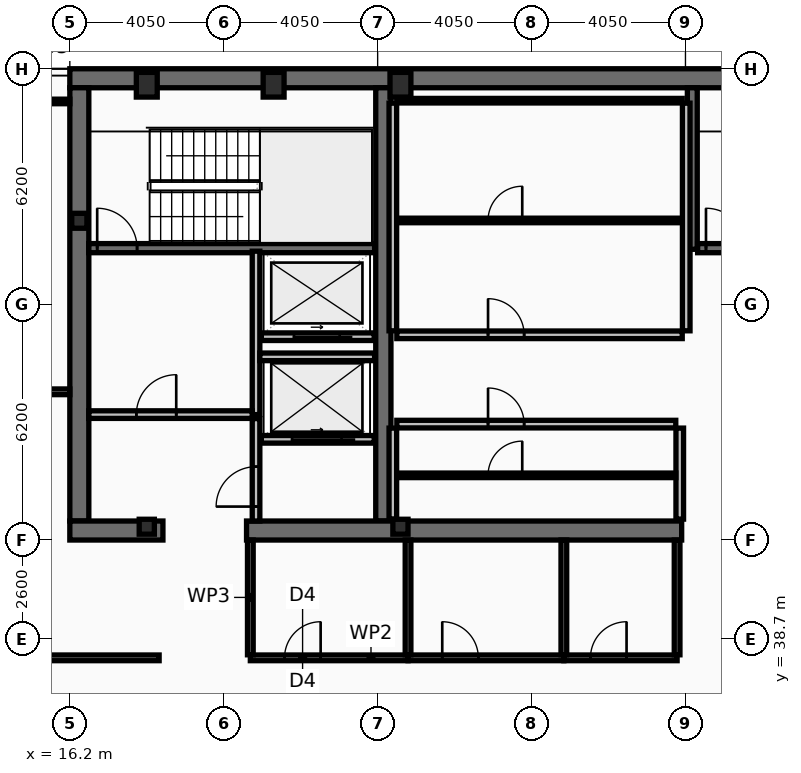
"""IFC4 building model, lengths in metres.
Left out: names, types, materials, properties, quantities, classifications, styles, units other than length and angle.
Written with IfcOpenShell. Run it as: python <this file> out.ifc"""

import sys

from ifc_helpers import new_model, si_unit, direction, frame, frame_2d, origin, origin_2d, place, context, subcontext, project, spatial, rectangle, hollow_rectangle, i_section, extrude, element, fill, save


model = new_model("IFC4")
c1 = context("Model", 3, precision=1e-05, world=origin(), true_north=direction((0.0, 1.0)))
c2 = subcontext(c1, "Body", "Model", "MODEL_VIEW")
j1 = project(units=[si_unit("LENGTHUNIT", "METRE"), si_unit("PLANEANGLEUNIT", "RADIAN")], contexts=[c1])
p1 = place(None, origin())
s1 = spatial("IfcSite", under=j1, at=p1, CompositionType="ELEMENT")
p2 = place(p1, origin())
s2 = spatial("IfcBuilding", under=s1, at=p2, CompositionType="ELEMENT")
p3 = place(p2, frame((0.0, 0.0, 302.2)))
s3 = spatial("IfcBuildingStorey", under=s2, at=p3, CompositionType="ELEMENT", Elevation=302.2)
p4 = place(p3, frame((16.2, 53.45, 0.0), z_axis=(0.0, 0.0, 1.0), x_axis=(1.0, 0.0, 0.0)))
e1 = element("IfcWall", 1, at=p4, inside=s3, PredefinedType="SHEAR", context=c2, shape_type="SweptSolid", body=[
    extrude(rectangle(XDim=40.5, YDim=0.5, at=frame_2d((20.25, 0.0))), origin(), (0.0, 0.0, 1.0), 3.38),
])
p5 = place(p3, frame((16.45, 41.8, 0.0), z_axis=(0.0, 0.0, 1.0), x_axis=(0.0, 1.0, 0.0)))
e2 = element("IfcWall", 2, at=p5, inside=s3, PredefinedType="SHEAR", context=c2, shape_type="SweptSolid", body=[
    extrude(rectangle(XDim=11.4, YDim=0.5, at=frame_2d((5.7, 0.0))), origin(), (0.0, 0.0, 1.0), 3.38),
])
p6 = place(p3, frame((24.45, 41.8, 0.0), z_axis=(0.0, 0.0, 1.0), x_axis=(0.0, 1.0, 0.0)))
e3 = element("IfcWall", 3, at=p6, inside=s3, PredefinedType="SHEAR", context=c2, shape_type="SweptSolid", body=[
    extrude(rectangle(XDim=11.4, YDim=0.4, at=frame_2d((5.7, 0.0))), origin(), (0.0, 0.0, 1.0), 3.38),
])
p7 = place(p3, frame((18.65, 41.55, 0.0), z_axis=(0.0, 0.0, 1.0), x_axis=(-1.0, 0.0, 0.0)))
e4 = element("IfcWall", 4, at=p7, inside=s3, PredefinedType="SHEAR", context=c2, shape_type="SweptSolid", body=[
    extrude(rectangle(XDim=2.45, YDim=0.5, at=frame_2d((1.225, 0.0))), origin(), (0.0, 0.0, 1.0), 3.38),
])
p8 = place(p3, frame((32.3, 41.55, 0.0), z_axis=(0.0, 0.0, 1.0), x_axis=(-1.0, 0.0, 0.0)))
e5 = element("IfcWall", 5, at=p8, inside=s3, PredefinedType="SHEAR", context=c2, shape_type="SweptSolid", body=[
    extrude(rectangle(XDim=11.45, YDim=0.5, at=frame_2d((5.725, 0.0))), origin(), (0.0, 0.0, 1.0), 3.38),
])
p9 = place(p3, frame((32.58, 48.95, 0.0), z_axis=(0.0, 0.0, 1.0), x_axis=(0.0, 1.0, 0.0)))
e6 = element("IfcWall", 6, at=p9, inside=s3, PredefinedType="SHEAR", context=c2, shape_type="SweptSolid", body=[
    extrude(rectangle(XDim=4.25, YDim=0.26, at=frame_2d((2.125, 0.0))), origin(), (0.0, 0.0, 1.0), 3.38),
])
p10 = place(p3, frame((16.7, 48.98, 0.0), z_axis=(0.0, 0.0, 1.0), x_axis=(1.0, 0.0, 0.0)))
e7 = element("IfcWall", 7, at=p10, inside=s3, PredefinedType="SHEAR", context=c2, shape_type="SweptSolid", body=[
    extrude(rectangle(XDim=7.52, YDim=0.24, at=frame_2d((3.76, 0.0))), origin(), (0.0, 0.0, 1.0), 3.38),
])
p11 = place(p10, frame((0.22, 0.0, 0.0)))
e8 = element("IfcOpeningElement", 8, at=p11, cuts=e7, PredefinedType="OPENING", context=c2, shape_type="SweptSolid", body=[
    extrude(rectangle(XDim=1.05, YDim=2.15, at=frame_2d((0.525, 1.075))), frame((0.0, 0.13, 0.0), z_axis=(0.0, -1.0, 0.0), x_axis=(1.0, 0.0, 0.0)), (0.0, 0.0, 1.0), 0.26),
])
p12 = place(p3, frame((32.72, 48.98, 0.0), z_axis=(0.0, 0.0, 1.0), x_axis=(1.0, 0.0, 0.0)))
e9 = element("IfcWall", 9, at=p12, inside=s3, PredefinedType="SHEAR", context=c2, shape_type="SweptSolid", body=[
    extrude(rectangle(XDim=7.56, YDim=0.24, at=frame_2d((3.78, 0.0))), origin(), (0.0, 0.0, 1.0), 3.38),
])
p13 = place(p12, frame((0.22, 0.0, 0.0)))
e10 = element("IfcOpeningElement", 10, at=p13, cuts=e9, PredefinedType="OPENING", context=c2, shape_type="SweptSolid", body=[
    extrude(rectangle(XDim=1.05, YDim=2.15, at=frame_2d((0.525, 1.075))), frame((0.0, 0.13, 0.0), z_axis=(0.0, -1.0, 0.0), x_axis=(1.0, 0.0, 0.0)), (0.0, 0.0, 1.0), 0.26),
])
for number, where, z_axis, x_axis in (
    (11, (18.225, 53.28, 0.0), (0.0, 0.0, 1.0), (1.0, 0.0, 0.0)),
    (12, (21.562, 53.28, 0.0), (0.0, 0.0, 1.0), (1.0, 0.0, 0.0)),
    (13, (24.9, 53.28, 0.0), (0.0, 0.0, 1.0), (1.0, 0.0, 0.0)),
):
    element("IfcColumn", number, at=place(p3, frame(where, z_axis=z_axis, x_axis=x_axis)), inside=s3, PredefinedType="COLUMN", context=c2, shape_type="SweptSolid", body=[
        extrude(hollow_rectangle(XDim=0.55, YDim=0.65, WallThickness=0.04, at=origin_2d()), origin(), (0.0, 0.0, 1.0), 3.6),
    ])
for number, where, z_axis, x_axis in (
    (14, (16.45, 49.7, 0.0), (0.0, 0.0, 1.0), (1.0, 0.0, 0.0)),
    (15, (18.225, 41.65, 0.0), (0.0, 0.0, 1.0), (1.0, 0.0, 0.0)),
    (16, (24.9, 41.65, 0.0), (0.0, 0.0, 1.0), (1.0, 0.0, 0.0)),
):
    element("IfcColumn", number, at=place(p3, frame(where, z_axis=z_axis, x_axis=x_axis)), inside=s3, PredefinedType="COLUMN", context=c2, shape_type="SweptSolid", body=[
        extrude(i_section(OverallWidth=0.399, OverallDepth=0.393, WebThickness=0.023, FlangeThickness=0.037, at=origin_2d()), origin(), (0.0, 0.0, 1.0), 3.6),
    ])
p14 = place(p3, frame((24.21, 43.95, 0.0), z_axis=(0.0, 0.0, 1.0), x_axis=(-1.0, 0.0, 0.0)))
e17 = element("IfcWall", 17, at=p14, inside=s3, PredefinedType="PARTITIONING", context=c2, shape_type="SweptSolid", body=[
    extrude(rectangle(XDim=2.97, YDim=0.2, at=frame_2d((1.485, 0.0))), origin(), (0.0, 0.0, 1.0), 3.38),
])
p15 = place(p14, frame((0.86, 0.0, 0.0)))
e18 = element("IfcOpeningElement", 18, at=p15, cuts=e17, PredefinedType="OPENING", context=c2, shape_type="SweptSolid", body=[
    extrude(rectangle(XDim=1.3, YDim=2.18, at=frame_2d((0.65, 1.09))), frame((0.0, 0.11, 0.0), z_axis=(0.0, -1.0, 0.0), x_axis=(1.0, 0.0, 0.0)), (0.0, 0.0, 1.0), 0.22),
])
p16 = place(p3, frame((24.21, 46.65, 0.0), z_axis=(0.0, 0.0, 1.0), x_axis=(-1.0, 0.0, 0.0)))
e19 = element("IfcWall", 19, at=p16, inside=s3, PredefinedType="PARTITIONING", context=c2, shape_type="SweptSolid", body=[
    extrude(rectangle(XDim=2.97, YDim=0.2, at=frame_2d((1.485, 0.0))), origin(), (0.0, 0.0, 1.0), 3.38),
])
p17 = place(p16, frame((0.91, 0.0, 0.0)))
e20 = element("IfcOpeningElement", 20, at=p17, cuts=e19, PredefinedType="OPENING", context=c2, shape_type="SweptSolid", body=[
    extrude(rectangle(XDim=1.2, YDim=2.18, at=frame_2d((0.6, 1.09))), frame((0.0, 0.11, 0.0), z_axis=(0.0, -1.0, 0.0), x_axis=(1.0, 0.0, 0.0)), (0.0, 0.0, 1.0), 0.22),
])
p18 = place(p3, frame((21.1, 44.6, 0.0), z_axis=(0.0, 0.0, 1.0), x_axis=(0.0, 1.0, 0.0)))
e21 = element("IfcWall", 21, at=p18, inside=s3, PredefinedType="PARTITIONING", context=c2, shape_type="SweptSolid", body=[
    extrude(rectangle(XDim=4.3, YDim=0.2, at=frame_2d((2.15, 0.0))), origin(), (0.0, 0.0, 1.0), 3.38),
])
p19 = place(p3, frame((16.7, 44.6, 0.0), z_axis=(0.0, 0.0, 1.0), x_axis=(1.0, 0.0, 0.0)))
e22 = element("IfcWall", 22, at=p19, inside=s3, PredefinedType="PARTITIONING", context=c2, shape_type="SweptSolid", body=[
    extrude(rectangle(XDim=4.3, YDim=0.2, at=frame_2d((2.15, 0.0))), origin(), (0.0, 0.0, 1.0), 3.38),
])
p20 = place(p19, frame((1.25, 0.0, 0.0)))
e23 = element("IfcOpeningElement", 23, at=p20, cuts=e22, PredefinedType="OPENING", context=c2, shape_type="SweptSolid", body=[
    extrude(rectangle(XDim=1.05, YDim=2.15, at=frame_2d((0.525, 1.075))), frame((0.0, 0.11, 0.0), z_axis=(0.0, -1.0, 0.0), x_axis=(1.0, 0.0, 0.0)), (0.0, 0.0, 1.0), 0.22),
])
p21 = place(p3, frame((21.2, 46.12, 0.0), z_axis=(0.0, 0.0, 1.0), x_axis=(1.0, 0.0, 0.0)))
e24 = element("IfcWall", 24, at=p21, inside=s3, PredefinedType="PARTITIONING", context=c2, shape_type="SweptSolid", body=[
    extrude(rectangle(XDim=3.02, YDim=0.2, at=frame_2d((1.51, 0.0))), origin(), (0.0, 0.0, 1.0), 3.38),
])
p22 = place(p3, frame((21.1, 41.8, 0.0), z_axis=(0.0, 0.0, 1.0), x_axis=(0.0, 1.0, 0.0)))
e25 = element("IfcWall", 25, at=p22, inside=s3, PredefinedType="PARTITIONING", context=c2, shape_type="SweptSolid", body=[
    extrude(rectangle(XDim=2.695, YDim=0.2, at=frame_2d((1.348, 0.0))), origin(), (0.0, 0.0, 1.0), 3.38),
])
p23 = place(p22, frame((0.38, 0.0, 0.0)))
e26 = element("IfcOpeningElement", 26, at=p23, cuts=e25, PredefinedType="OPENING", context=c2, shape_type="SweptSolid", body=[
    extrude(rectangle(XDim=1.05, YDim=2.15, at=frame_2d((0.525, 1.075))), frame((0.0, 0.11, 0.0), z_axis=(0.0, -1.0, 0.0), x_axis=(1.0, 0.0, 0.0)), (0.0, 0.0, 1.0), 0.22),
])
for number, where, z_axis, x_axis in (
    (27, (24.7, 46.805, 0.0), (0.0, 0.0, 1.0), (0.0, 1.0, 0.0)),
    (28, (32.42, 46.805, 0.0), (0.0, 0.0, 1.0), (0.0, 1.0, 0.0)),
):
    element("IfcWall", number, at=place(p3, frame(where, z_axis=z_axis, x_axis=x_axis)), inside=s3, PredefinedType="PARTITIONING", context=c2, shape_type="SweptSolid", body=[
        extrude(rectangle(XDim=5.99, YDim=0.2, at=frame_2d((2.995, 0.0))), origin(), (0.0, 0.0, 1.0), 3.38),
    ])
p24 = place(p3, frame((24.805, 52.86, 0.0), z_axis=(0.0, 0.0, 1.0), x_axis=(1.0, 0.0, 0.0)))
e29 = element("IfcWall", 29, at=p24, inside=s3, PredefinedType="PARTITIONING", context=c2, shape_type="SweptSolid", body=[
    extrude(rectangle(XDim=7.51, YDim=0.12, at=frame_2d((3.755, 0.0))), origin(), (0.0, 0.0, 1.0), 3.38),
])
p25 = place(p3, frame((24.805, 49.709, 0.0), z_axis=(0.0, 0.0, 1.0), x_axis=(1.0, 0.0, 0.0)))
e30 = element("IfcWall", 30, at=p25, inside=s3, PredefinedType="PARTITIONING", context=c2, shape_type="SweptSolid", body=[
    extrude(rectangle(XDim=7.51, YDim=0.12, at=frame_2d((3.755, 0.0))), origin(), (0.0, 0.0, 1.0), 3.38),
])
p26 = place(p25, frame((2.4, 0.0, 0.0)))
e31 = element("IfcOpeningElement", 31, at=p26, cuts=e30, PredefinedType="OPENING", context=c2, shape_type="SweptSolid", body=[
    extrude(rectangle(XDim=0.9, YDim=2.05, at=frame_2d((0.45, 1.025))), frame((0.0, 0.07, 0.0), z_axis=(0.0, -1.0, 0.0), x_axis=(1.0, 0.0, 0.0)), (0.0, 0.0, 1.0), 0.14),
])
p27 = place(p3, frame((24.805, 46.7, 0.0), z_axis=(0.0, 0.0, 1.0), x_axis=(1.0, 0.0, 0.0)))
e32 = element("IfcWall", 32, at=p27, inside=s3, PredefinedType="PARTITIONING", context=c2, shape_type="SweptSolid", body=[
    extrude(rectangle(XDim=7.51, YDim=0.2, at=frame_2d((3.755, 0.0))), origin(), (0.0, 0.0, 1.0), 3.38),
])
p28 = place(p27, frame((2.4, 0.0, 0.0)))
e33 = element("IfcOpeningElement", 33, at=p28, cuts=e32, PredefinedType="OPENING", context=c2, shape_type="SweptSolid", body=[
    extrude(rectangle(XDim=0.95, YDim=2.1, at=frame_2d((0.475, 1.05))), frame((0.0, 0.11, 0.0), z_axis=(0.0, -1.0, 0.0), x_axis=(1.0, 0.0, 0.0)), (0.0, 0.0, 1.0), 0.22),
])
for number, where, z_axis, x_axis in (
    (34, (24.7, 41.85, 0.0), (0.0, 0.0, 1.0), (0.0, 1.0, 0.0)),
    (35, (32.25, 41.85, 0.0), (0.0, 0.0, 1.0), (0.0, 1.0, 0.0)),
):
    element("IfcWall", number, at=place(p3, frame(where, z_axis=z_axis, x_axis=x_axis)), inside=s3, PredefinedType="PARTITIONING", context=c2, shape_type="SweptSolid", body=[
        extrude(rectangle(XDim=2.395, YDim=0.2, at=frame_2d((1.198, 0.0))), origin(), (0.0, 0.0, 1.0), 3.38),
    ])
p29 = place(p3, frame((24.805, 43.002, 0.0), z_axis=(0.0, 0.0, 1.0), x_axis=(1.0, 0.0, 0.0)))
e36 = element("IfcWall", 36, at=p29, inside=s3, PredefinedType="PARTITIONING", context=c2, shape_type="SweptSolid", body=[
    extrude(rectangle(XDim=7.34, YDim=0.12, at=frame_2d((3.67, 0.0))), origin(), (0.0, 0.0, 1.0), 3.38),
])
p30 = place(p29, frame((2.4, 0.0, 0.0)))
e37 = element("IfcOpeningElement", 37, at=p30, cuts=e36, PredefinedType="OPENING", context=c2, shape_type="SweptSolid", body=[
    extrude(rectangle(XDim=0.9, YDim=2.05, at=frame_2d((0.45, 1.025))), frame((0.0, 0.07, 0.0), z_axis=(0.0, -1.0, 0.0), x_axis=(1.0, 0.0, 0.0)), (0.0, 0.0, 1.0), 0.14),
])
p31 = place(p3, frame((24.805, 44.35, 0.0), z_axis=(0.0, 0.0, 1.0), x_axis=(1.0, 0.0, 0.0)))
e38 = element("IfcWall", 38, at=p31, inside=s3, PredefinedType="PARTITIONING", context=c2, shape_type="SweptSolid", body=[
    extrude(rectangle(XDim=7.34, YDim=0.2, at=frame_2d((3.67, 0.0))), origin(), (0.0, 0.0, 1.0), 3.38),
])
p32 = place(p31, frame((2.4, 0.0, 0.0)))
e39 = element("IfcOpeningElement", 39, at=p32, cuts=e38, PredefinedType="OPENING", context=c2, shape_type="SweptSolid", body=[
    extrude(rectangle(XDim=0.95, YDim=2.1, at=frame_2d((0.475, 1.05))), frame((0.0, 0.11, 0.0), z_axis=(0.0, -1.0, 0.0), x_axis=(1.0, 0.0, 0.0)), (0.0, 0.0, 1.0), 0.22),
])
p33 = place(p3, frame((20.95, 38.2, 0.0), z_axis=(0.0, 0.0, 1.0), x_axis=(1.0, 0.0, 0.0)))
e40 = element("IfcWall", 40, at=p33, inside=s3, PredefinedType="PARTITIONING", context=c2, shape_type="SweptSolid", body=[
    extrude(rectangle(XDim=4.15, YDim=0.15, at=frame_2d((2.075, 0.0))), origin(), (0.0, 0.0, 1.0), 2.72),
])
p34 = place(p33, frame((0.9, 0.0, 0.0)))
e41 = element("IfcOpeningElement", 41, at=p34, cuts=e40, PredefinedType="OPENING", context=c2, shape_type="SweptSolid", body=[
    extrude(rectangle(XDim=0.95, YDim=2.05, at=frame_2d((0.475, 1.025))), frame((0.0, 0.085, 0.0), z_axis=(0.0, -1.0, 0.0), x_axis=(1.0, 0.0, 0.0)), (0.0, 0.0, 1.0), 0.17),
])
p35 = place(p3, frame((25.1, 38.2, 0.0), z_axis=(0.0, 0.0, 1.0), x_axis=(1.0, 0.0, 0.0)))
e42 = element("IfcWall", 42, at=p35, inside=s3, PredefinedType="PARTITIONING", context=c2, shape_type="SweptSolid", body=[
    extrude(rectangle(XDim=4.1, YDim=0.15, at=frame_2d((2.05, 0.0))), origin(), (0.0, 0.0, 1.0), 2.72),
])
p36 = place(p35, frame((0.9, 0.0, 0.0)))
e43 = element("IfcOpeningElement", 43, at=p36, cuts=e42, PredefinedType="OPENING", context=c2, shape_type="SweptSolid", body=[
    extrude(rectangle(XDim=0.95, YDim=2.05, at=frame_2d((0.475, 1.025))), frame((0.0, 0.085, 0.0), z_axis=(0.0, -1.0, 0.0), x_axis=(1.0, 0.0, 0.0)), (0.0, 0.0, 1.0), 0.17),
])
p37 = place(p3, frame((29.2, 38.2, 0.0), z_axis=(0.0, 0.0, 1.0), x_axis=(1.0, 0.0, 0.0)))
e44 = element("IfcWall", 44, at=p37, inside=s3, PredefinedType="PARTITIONING", context=c2, shape_type="SweptSolid", body=[
    extrude(rectangle(XDim=2.98, YDim=0.15, at=frame_2d((1.49, 0.0))), origin(), (0.0, 0.0, 1.0), 2.72),
])
p38 = place(p37, frame((0.7, 0.0, 0.0)))
e45 = element("IfcOpeningElement", 45, at=p38, cuts=e44, PredefinedType="OPENING", context=c2, shape_type="SweptSolid", body=[
    extrude(rectangle(XDim=0.95, YDim=2.05, at=frame_2d((0.475, 1.025))), frame((0.0, 0.085, 0.0), z_axis=(0.0, -1.0, 0.0), x_axis=(1.0, 0.0, 0.0)), (0.0, 0.0, 1.0), 0.17),
])
p39 = place(p3, frame((20.95, 38.28, 0.0), z_axis=(0.0, 0.0, 1.0), x_axis=(0.0, 1.0, 0.0)))
e46 = element("IfcWall", 46, at=p39, inside=s3, PredefinedType="PARTITIONING", context=c2, shape_type="SweptSolid", body=[
    extrude(rectangle(XDim=3.02, YDim=0.15, at=frame_2d((1.51, 0.0))), origin(), (0.0, 0.0, 1.0), 3.38),
])
p40 = place(p3, frame((25.1, 38.28, 0.0), z_axis=(0.0, 0.0, 1.0), x_axis=(0.0, 1.0, 0.0)))
e47 = element("IfcWall", 47, at=p40, inside=s3, PredefinedType="PARTITIONING", context=c2, shape_type="SweptSolid", body=[
    extrude(rectangle(XDim=3.02, YDim=0.15, at=frame_2d((1.51, 0.0))), origin(), (0.0, 0.0, 1.0), 2.72),
])
for number, where, z_axis, x_axis in (
    (48, (29.2, 38.28, 0.0), (0.0, 0.0, 1.0), (0.0, 1.0, 0.0)),
    (49, (32.18, 38.28, 0.0), (0.0, 0.0, 1.0), (0.0, 1.0, 0.0)),
):
    element("IfcWall", number, at=place(p3, frame(where, z_axis=z_axis, x_axis=x_axis)), inside=s3, PredefinedType="PARTITIONING", context=c2, shape_type="SweptSolid", body=[
        extrude(rectangle(XDim=3.02, YDim=0.15, at=frame_2d((1.51, 0.0))), origin(), (0.0, 0.0, 1.0), 3.38),
    ])
p41 = place(p3, frame((12.03, 38.2, 0.0), z_axis=(0.0, 0.0, 1.0), x_axis=(1.0, 0.0, 0.0)))
e50 = element("IfcWall", 50, at=p41, inside=s3, PredefinedType="PARTITIONING", context=c2, shape_type="SweptSolid", body=[
    extrude(rectangle(XDim=6.52, YDim=0.15, at=frame_2d((3.26, 0.0))), origin(), (0.0, 0.0, 1.0), 2.72),
])
p42 = place(p41, frame((2.32, 0.0, 0.0)))
e51 = element("IfcOpeningElement", 51, at=p42, cuts=e50, PredefinedType="OPENING", context=c2, shape_type="SweptSolid", body=[
    extrude(rectangle(XDim=0.95, YDim=2.05, at=frame_2d((0.475, 1.025))), frame((0.0, 0.085, 0.0), z_axis=(0.0, -1.0, 0.0), x_axis=(1.0, 0.0, 0.0)), (0.0, 0.0, 1.0), 0.17),
])
p43 = place(p3, frame((12.095, 45.2, 0.0), z_axis=(0.0, 0.0, 1.0), x_axis=(1.0, 0.0, 0.0)))
e52 = element("IfcWall", 52, at=p43, inside=s3, PredefinedType="PARTITIONING", context=c2, shape_type="SweptSolid", body=[
    extrude(rectangle(XDim=4.105, YDim=0.15, at=frame_2d((2.052, 0.0))), origin(), (0.0, 0.0, 1.0), 2.82),
])
p44 = place(p43, frame((2.32, 0.0, 0.0)))
e53 = element("IfcOpeningElement", 53, at=p44, cuts=e52, PredefinedType="OPENING", context=c2, shape_type="SweptSolid", body=[
    extrude(rectangle(XDim=0.9, YDim=2.05, at=frame_2d((0.45, 1.025))), frame((0.0, 0.085, 0.0), z_axis=(0.0, -1.0, 0.0), x_axis=(1.0, 0.0, 0.0)), (0.0, 0.0, 1.0), 0.17),
])
p45 = place(p3, frame((12.095, 52.84, 0.0), z_axis=(0.0, 0.0, 1.0), x_axis=(1.0, 0.0, 0.0)))
e54 = element("IfcWall", 54, at=p45, inside=s3, PredefinedType="PARTITIONING", context=c2, shape_type="SweptSolid", body=[
    extrude(rectangle(XDim=4.105, YDim=0.12, at=frame_2d((2.052, 0.0))), origin(), (0.0, 0.0, 1.0), 3.38),
])
p46 = place(p11, origin())
e55 = element("IfcDoor", 55, at=p46, inside=s3, OperationType="SINGLE_SWING_LEFT", PredefinedType="DOOR", context=c2, shape_type="SweptSolid", body=[
    extrude(rectangle(XDim=1.05, YDim=2.15, at=frame_2d((0.525, 1.075))), frame((0.0, 0.025, 0.0), z_axis=(0.0, -1.0, 0.0), x_axis=(1.0, 0.0, 0.0)), (0.0, 0.0, 1.0), 0.05),
])
fill(e8, e55)
p47 = place(p13, origin())
e56 = element("IfcDoor", 56, at=p47, inside=s3, OperationType="SINGLE_SWING_LEFT", PredefinedType="DOOR", context=c2, shape_type="SweptSolid", body=[
    extrude(rectangle(XDim=1.05, YDim=2.15, at=frame_2d((0.525, 1.075))), frame((0.0, 0.025, 0.0), z_axis=(0.0, -1.0, 0.0), x_axis=(1.0, 0.0, 0.0)), (0.0, 0.0, 1.0), 0.05),
])
fill(e10, e56)
p48 = place(p15, origin())
e57 = element("IfcDoor", 57, at=p48, inside=s3, OperationType="SLIDING_TO_LEFT", PredefinedType="DOOR", context=c2, shape_type="SweptSolid", body=[
    extrude(rectangle(XDim=1.3, YDim=2.18, at=frame_2d((0.65, 1.09))), frame((0.0, 0.025, 0.0), z_axis=(0.0, -1.0, 0.0), x_axis=(1.0, 0.0, 0.0)), (0.0, 0.0, 1.0), 0.05),
])
fill(e18, e57)
p49 = place(p17, origin())
e58 = element("IfcDoor", 58, at=p49, inside=s3, OperationType="SLIDING_TO_LEFT", PredefinedType="DOOR", context=c2, shape_type="SweptSolid", body=[
    extrude(rectangle(XDim=1.2, YDim=2.18, at=frame_2d((0.6, 1.09))), frame((0.0, 0.025, 0.0), z_axis=(0.0, -1.0, 0.0), x_axis=(1.0, 0.0, 0.0)), (0.0, 0.0, 1.0), 0.05),
])
fill(e20, e58)
p50 = place(p20, origin())
e59 = element("IfcDoor", 59, at=p50, inside=s3, OperationType="SINGLE_SWING_RIGHT", PredefinedType="DOOR", context=c2, shape_type="SweptSolid", body=[
    extrude(rectangle(XDim=1.05, YDim=2.15, at=frame_2d((0.525, 1.075))), frame((0.0, 0.025, 0.0), z_axis=(0.0, -1.0, 0.0), x_axis=(1.0, 0.0, 0.0)), (0.0, 0.0, 1.0), 0.05),
])
fill(e23, e59)
p51 = place(p23, origin())
e60 = element("IfcDoor", 60, at=p51, inside=s3, OperationType="SINGLE_SWING_LEFT", PredefinedType="DOOR", context=c2, shape_type="SweptSolid", body=[
    extrude(rectangle(XDim=1.05, YDim=2.15, at=frame_2d((0.525, 1.075))), frame((0.0, 0.025, 0.0), z_axis=(0.0, -1.0, 0.0), x_axis=(1.0, 0.0, 0.0)), (0.0, 0.0, 1.0), 0.05),
])
fill(e26, e60)
p52 = place(p26, origin())
e61 = element("IfcDoor", 61, at=p52, inside=s3, OperationType="SINGLE_SWING_RIGHT", PredefinedType="DOOR", context=c2, shape_type="SweptSolid", body=[
    extrude(rectangle(XDim=0.9, YDim=2.05, at=frame_2d((0.45, 1.025))), frame((0.0, 0.025, 0.0), z_axis=(0.0, -1.0, 0.0), x_axis=(1.0, 0.0, 0.0)), (0.0, 0.0, 1.0), 0.05),
])
fill(e31, e61)
p53 = place(p28, origin())
e62 = element("IfcDoor", 62, at=p53, inside=s3, OperationType="SINGLE_SWING_LEFT", PredefinedType="DOOR", context=c2, shape_type="SweptSolid", body=[
    extrude(rectangle(XDim=0.95, YDim=2.1, at=frame_2d((0.475, 1.05))), frame((0.0, 0.025, 0.0), z_axis=(0.0, -1.0, 0.0), x_axis=(1.0, 0.0, 0.0)), (0.0, 0.0, 1.0), 0.05),
])
fill(e33, e62)
p54 = place(p30, origin())
e63 = element("IfcDoor", 63, at=p54, inside=s3, OperationType="SINGLE_SWING_RIGHT", PredefinedType="DOOR", context=c2, shape_type="SweptSolid", body=[
    extrude(rectangle(XDim=0.9, YDim=2.05, at=frame_2d((0.45, 1.025))), frame((0.0, 0.025, 0.0), z_axis=(0.0, -1.0, 0.0), x_axis=(1.0, 0.0, 0.0)), (0.0, 0.0, 1.0), 0.05),
])
fill(e37, e63)
p55 = place(p32, origin())
e64 = element("IfcDoor", 64, at=p55, inside=s3, OperationType="SINGLE_SWING_LEFT", PredefinedType="DOOR", context=c2, shape_type="SweptSolid", body=[
    extrude(rectangle(XDim=0.95, YDim=2.1, at=frame_2d((0.475, 1.05))), frame((0.0, 0.025, 0.0), z_axis=(0.0, -1.0, 0.0), x_axis=(1.0, 0.0, 0.0)), (0.0, 0.0, 1.0), 0.05),
])
fill(e39, e64)
p56 = place(p34, origin())
e65 = element("IfcDoor", 65, at=p56, inside=s3, OperationType="SINGLE_SWING_RIGHT", PredefinedType="DOOR", context=c2, shape_type="SweptSolid", body=[
    extrude(rectangle(XDim=0.95, YDim=2.05, at=frame_2d((0.475, 1.025))), frame((0.0, 0.025, 0.0), z_axis=(0.0, -1.0, 0.0), x_axis=(1.0, 0.0, 0.0)), (0.0, 0.0, 1.0), 0.05),
])
fill(e41, e65)
p57 = place(p36, origin())
e66 = element("IfcDoor", 66, at=p57, inside=s3, OperationType="SINGLE_SWING_LEFT", PredefinedType="DOOR", context=c2, shape_type="SweptSolid", body=[
    extrude(rectangle(XDim=0.95, YDim=2.05, at=frame_2d((0.475, 1.025))), frame((0.0, 0.025, 0.0), z_axis=(0.0, -1.0, 0.0), x_axis=(1.0, 0.0, 0.0)), (0.0, 0.0, 1.0), 0.05),
])
fill(e43, e66)
p58 = place(p38, origin())
e67 = element("IfcDoor", 67, at=p58, inside=s3, OperationType="SINGLE_SWING_RIGHT", PredefinedType="DOOR", context=c2, shape_type="SweptSolid", body=[
    extrude(rectangle(XDim=0.95, YDim=2.05, at=frame_2d((0.475, 1.025))), frame((0.0, 0.025, 0.0), z_axis=(0.0, -1.0, 0.0), x_axis=(1.0, 0.0, 0.0)), (0.0, 0.0, 1.0), 0.05),
])
fill(e45, e67)
save(model, sys.argv[1])
